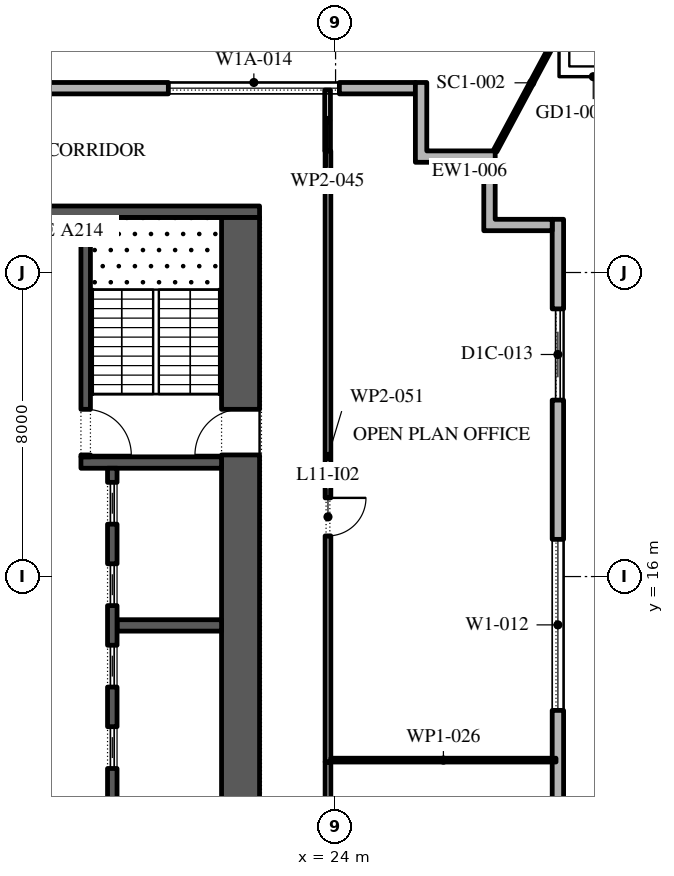
"""IFC4 building model, lengths in metres.
Left out: names, types, materials, properties, quantities, classifications, styles, units other than length and angle.
Written with IfcOpenShell. Run it as: python <this file> out.ifc"""

import sys

from ifc_helpers import new_model, si_unit, direction, frame, frame_2d, origin, place, context, subcontext, project, spatial, polyline, rectangle, outline, extrude, element, fill, save


model = new_model("IFC4")
c1 = context("Model", 3, precision=1e-05, world=origin(), true_north=direction((0.0, 1.0)))
c2 = subcontext(c1, "Body", "Model", "MODEL_VIEW")
j1 = project(units=[si_unit("LENGTHUNIT", "METRE"), si_unit("PLANEANGLEUNIT", "RADIAN")], contexts=[c1])
p1 = place(None, origin())
s1 = spatial("IfcSite", under=j1, at=p1, CompositionType="ELEMENT")
p2 = place(p1, origin())
s2 = spatial("IfcBuilding", under=s1, at=p2, CompositionType="ELEMENT")
p3 = place(p2, frame((0.0, 0.0, 56.4)))
s3 = spatial("IfcBuildingStorey", under=s2, at=p3, CompositionType="ELEMENT", Elevation=56.4)
p4 = place(p3, frame((29.85, -24.1, 0.0), z_axis=(0.0, 0.0, 1.0), x_axis=(0.0, 1.0, 0.0)))
e1 = element("IfcWall", 1, at=p4, inside=s3, PredefinedType="STANDARD", context=c2, shape_type="SweptSolid", body=[
    extrude(rectangle(XDim=49.5, YDim=0.3, at=frame_2d((24.75, 0.0))), origin(), (0.0, 0.0, 1.0), 4.0),
])
p5 = place(p4, frame((1.157, 0.0, 0.45)))
e2 = element("IfcOpeningElement", 2, at=p5, cuts=e1, PredefinedType="OPENING", context=c2, shape_type="SweptSolid", body=[
    extrude(rectangle(XDim=4.5, YDim=3.05, at=frame_2d((2.25, 1.525))), frame((0.0, 0.16, 0.0), z_axis=(0.0, -1.0, 0.0), x_axis=(1.0, 0.0, 0.0)), (0.0, 0.0, 1.0), 0.32),
])
p6 = place(p4, frame((8.121, 0.0, 0.45)))
e3 = element("IfcOpeningElement", 3, at=p6, cuts=e1, PredefinedType="OPENING", context=c2, shape_type="SweptSolid", body=[
    extrude(rectangle(XDim=4.5, YDim=2.825, at=frame_2d((2.25, 1.413))), frame((0.0, 0.16, 0.0), z_axis=(0.0, -1.0, 0.0), x_axis=(1.0, 0.0, 0.0)), (0.0, 0.0, 1.0), 0.32),
])
p7 = place(p4, frame((16.286, 0.0, 0.0)))
e4 = element("IfcOpeningElement", 4, at=p7, cuts=e1, PredefinedType="OPENING", context=c2, shape_type="SweptSolid", body=[
    extrude(rectangle(XDim=2.4, YDim=3.325, at=frame_2d((1.2, 1.663))), frame((0.0, 0.16, 0.0), z_axis=(0.0, -1.0, 0.0), x_axis=(1.0, 0.0, 0.0)), (0.0, 0.0, 1.0), 0.32),
])
p8 = place(p4, frame((22.35, 0.0, 0.45)))
e5 = element("IfcOpeningElement", 5, at=p8, cuts=e1, PredefinedType="OPENING", context=c2, shape_type="SweptSolid", body=[
    extrude(rectangle(XDim=4.5, YDim=2.875, at=frame_2d((2.25, 1.438))), frame((0.0, 0.16, 0.0), z_axis=(0.0, -1.0, 0.0), x_axis=(1.0, 0.0, 0.0)), (0.0, 0.0, 1.0), 0.32),
])
p9 = place(p4, frame((29.464, 0.0, 0.45)))
e6 = element("IfcOpeningElement", 6, at=p9, cuts=e1, PredefinedType="OPENING", context=c2, shape_type="SweptSolid", body=[
    extrude(rectangle(XDim=4.5, YDim=2.875, at=frame_2d((2.25, 1.438))), frame((0.0, 0.16, 0.0), z_axis=(0.0, -1.0, 0.0), x_axis=(1.0, 0.0, 0.0)), (0.0, 0.0, 1.0), 0.32),
])
p10 = place(p4, frame((36.579, 0.0, 0.45)))
e7 = element("IfcOpeningElement", 7, at=p10, cuts=e1, PredefinedType="OPENING", context=c2, shape_type="SweptSolid", body=[
    extrude(rectangle(XDim=4.5, YDim=3.05, at=frame_2d((2.25, 1.525))), frame((0.0, 0.16, 0.0), z_axis=(0.0, -1.0, 0.0), x_axis=(1.0, 0.0, 0.0)), (0.0, 0.0, 1.0), 0.32),
])
p11 = place(p4, frame((44.743, 0.0, 0.0)))
e8 = element("IfcOpeningElement", 8, at=p11, cuts=e1, PredefinedType="OPENING", context=c2, shape_type="SweptSolid", body=[
    extrude(rectangle(XDim=2.4, YDim=3.325, at=frame_2d((1.2, 1.663))), frame((0.0, 0.16, 0.0), z_axis=(0.0, -1.0, 0.0), x_axis=(1.0, 0.0, 0.0)), (0.0, 0.0, 1.0), 0.32),
])
p12 = place(p3, frame((26.1, 28.85, 0.0), z_axis=(0.0, 0.0, 1.0), x_axis=(-1.0, 0.0, 0.0)))
e9 = element("IfcWall", 9, at=p12, inside=s3, PredefinedType="STANDARD", context=c2, shape_type="SweptSolid", body=[
    extrude(rectangle(XDim=52.5, YDim=0.3, at=frame_2d((26.25, 0.0))), origin(), (0.0, 0.0, 1.0), 4.0),
])
p13 = place(p12, frame((2.0, 0.0, 0.45)))
e10 = element("IfcOpeningElement", 10, at=p13, cuts=e9, PredefinedType="OPENING", context=c2, shape_type="SweptSolid", body=[
    extrude(rectangle(XDim=4.5, YDim=3.0, at=frame_2d((2.25, 1.5))), frame((0.0, 0.16, 0.0), z_axis=(0.0, -1.0, 0.0), x_axis=(1.0, 0.0, 0.0)), (0.0, 0.0, 1.0), 0.32),
])
p14 = place(p12, frame((10.65, 0.0, 0.45)))
e11 = element("IfcOpeningElement", 11, at=p14, cuts=e9, PredefinedType="OPENING", context=c2, shape_type="SweptSolid", body=[
    extrude(rectangle(XDim=4.5, YDim=3.0, at=frame_2d((2.25, 1.5))), frame((0.0, 0.16, 0.0), z_axis=(0.0, -1.0, 0.0), x_axis=(1.0, 0.0, 0.0)), (0.0, 0.0, 1.0), 0.32),
])
p15 = place(p12, frame((20.5, 0.0, 0.0)))
e12 = element("IfcOpeningElement", 12, at=p15, cuts=e9, PredefinedType="OPENING", context=c2, shape_type="SweptSolid", body=[
    extrude(rectangle(XDim=2.4, YDim=3.5, at=frame_2d((1.2, 1.75))), frame((0.0, 0.16, 0.0), z_axis=(0.0, -1.0, 0.0), x_axis=(1.0, 0.0, 0.0)), (0.0, 0.0, 1.0), 0.32),
])
p16 = place(p12, frame((28.25, 0.0, 0.45)))
e13 = element("IfcOpeningElement", 13, at=p16, cuts=e9, PredefinedType="OPENING", context=c2, shape_type="SweptSolid", body=[
    extrude(rectangle(XDim=4.5, YDim=3.0, at=frame_2d((2.25, 1.5))), frame((0.0, 0.16, 0.0), z_axis=(0.0, -1.0, 0.0), x_axis=(1.0, 0.0, 0.0)), (0.0, 0.0, 1.0), 0.32),
])
p17 = place(p12, frame((37.05, 0.0, 0.45)))
e14 = element("IfcOpeningElement", 14, at=p17, cuts=e9, PredefinedType="OPENING", context=c2, shape_type="SweptSolid", body=[
    extrude(rectangle(XDim=4.5, YDim=3.0, at=frame_2d((2.25, 1.5))), frame((0.0, 0.16, 0.0), z_axis=(0.0, -1.0, 0.0), x_axis=(1.0, 0.0, 0.0)), (0.0, 0.0, 1.0), 0.32),
])
p18 = place(p12, frame((45.85, 0.0, 0.45)))
e15 = element("IfcOpeningElement", 15, at=p18, cuts=e9, PredefinedType="OPENING", context=c2, shape_type="SweptSolid", body=[
    extrude(rectangle(XDim=4.5, YDim=3.0, at=frame_2d((2.25, 1.5))), frame((0.0, 0.16, 0.0), z_axis=(0.0, -1.0, 0.0), x_axis=(1.0, 0.0, 0.0)), (0.0, 0.0, 1.0), 0.32),
])
p19 = place(p3, origin())
e16 = element("IfcWall", 16, at=p19, inside=s3, PredefinedType="STANDARD", context=c2, shape_type="SweptSolid", body=[
    extrude(outline(polyline([(27.9, 26.9), (26.1, 26.9), (26.1, 29.0), (26.4, 29.0), (26.4, 27.2), (28.2, 27.2), (28.2, 25.4), (29.7, 25.4), (29.7, 25.1), (27.9, 25.1), (27.9, 26.9)])), origin(), (0.0, 0.0, 1.0), 4.0),
])
p20 = place(p3, frame((28.2, 27.2, -0.05), z_axis=(0.0, 0.0, 1.0), x_axis=(0.472846131844, 0.881145013945, 0.0)))
e17 = element("IfcWall", 17, at=p20, inside=s3, PredefinedType="STANDARD", context=c2, shape_type="SweptSolid", body=[
    extrude(rectangle(XDim=4.066, YDim=0.1, at=frame_2d((2.033, 0.0))), origin(), (0.0, 0.0, 1.0), 4.05),
])
p21 = place(p3, frame((21.5, -2.45, 0.0), z_axis=(0.0, 0.0, 1.0), x_axis=(0.0, 1.0, 0.0)))
e18 = element("IfcWall", 18, at=p21, inside=s3, PredefinedType="SHEAR", context=c2, shape_type="SweptSolid", body=[
    extrude(rectangle(XDim=27.9, YDim=1.0, at=frame_2d((13.95, 0.0))), origin(), (0.0, 0.0, 1.0), 4.0),
])
p22 = place(p21, frame((5.05, 0.0, 0.0)))
e19 = element("IfcOpeningElement", 19, at=p22, cuts=e18, PredefinedType="OPENING", context=c2, shape_type="SweptSolid", body=[
    extrude(rectangle(XDim=1.2, YDim=2.1, at=frame_2d((0.6, 1.05))), frame((0.0, 0.51, 0.0), z_axis=(0.0, -1.0, 0.0), x_axis=(1.0, 0.0, 0.0)), (0.0, 0.0, 1.0), 1.02),
])
p23 = place(p21, frame((21.65, 0.0, 0.0)))
e20 = element("IfcOpeningElement", 20, at=p23, cuts=e18, PredefinedType="OPENING", context=c2, shape_type="SweptSolid", body=[
    extrude(rectangle(XDim=1.2, YDim=2.1, at=frame_2d((0.6, 1.05))), frame((0.0, 0.51, 0.0), z_axis=(0.0, -1.0, 0.0), x_axis=(1.0, 0.0, 0.0)), (0.0, 0.0, 1.0), 1.02),
])
p24 = place(p3, frame((10.0, 25.6, 0.0), z_axis=(0.0, 0.0, 1.0), x_axis=(1.0, 0.0, 0.0)))
e21 = element("IfcWall", 21, at=p24, inside=s3, PredefinedType="SHEAR", context=c2, shape_type="SweptSolid", body=[
    extrude(rectangle(XDim=12.0, YDim=0.3, at=frame_2d((6.0, 0.0))), origin(), (0.0, 0.0, 1.0), 4.0),
])
p25 = place(p3, frame((17.3, 19.0, 0.0), z_axis=(0.0, 0.0, 1.0), x_axis=(1.0, 0.0, 0.0)))
e22 = element("IfcWall", 22, at=p25, inside=s3, PredefinedType="SHEAR", context=c2, shape_type="SweptSolid", body=[
    extrude(rectangle(XDim=3.7, YDim=0.3, at=frame_2d((1.85, 0.0))), origin(), (0.0, 0.0, 1.0), 4.0),
])
p26 = place(p3, frame((17.425, 19.15, 0.0), z_axis=(0.0, 0.0, 1.0), x_axis=(0.0, 1.0, 0.0)))
e23 = element("IfcWall", 23, at=p26, inside=s3, PredefinedType="SHEAR", context=c2, shape_type="SweptSolid", body=[
    extrude(rectangle(XDim=6.3, YDim=0.25, at=frame_2d((3.15, 0.0))), origin(), (0.0, 0.0, 1.0), 4.0),
])
p27 = place(p26, frame((0.05, 0.0, 0.0)))
e24 = element("IfcOpeningElement", 24, at=p27, cuts=e23, PredefinedType="OPENING", context=c2, shape_type="SweptSolid", body=[
    extrude(rectangle(XDim=1.2, YDim=2.1, at=frame_2d((0.6, 1.05))), frame((0.0, 0.135, 0.0), z_axis=(0.0, -1.0, 0.0), x_axis=(1.0, 0.0, 0.0)), (0.0, 0.0, 1.0), 0.27),
])
p28 = place(p3, frame((18.25, 14.714, 0.0), z_axis=(0.0, 0.0, 1.0), x_axis=(1.0, 0.0, 0.0)))
e25 = element("IfcWall", 25, at=p28, inside=s3, PredefinedType="SHEAR", context=c2, shape_type="SweptSolid", body=[
    extrude(rectangle(XDim=2.75, YDim=0.3, at=frame_2d((1.375, 0.0))), origin(), (0.0, 0.0, 1.0), 4.0),
])
p29 = place(p3, frame((18.125, 4.15, 0.0), z_axis=(0.0, 0.0, 1.0), x_axis=(0.0, 1.0, 0.0)))
e26 = element("IfcWall", 26, at=p29, inside=s3, PredefinedType="SHEAR", context=c2, shape_type="SweptSolid", body=[
    extrude(rectangle(XDim=14.7, YDim=0.25, at=frame_2d((7.35, 0.0))), origin(), (0.0, 0.0, 1.0), 4.0),
])
p30 = place(p29, frame((0.371, 0.0, 0.0)))
e27 = element("IfcOpeningElement", 27, at=p30, cuts=e26, PredefinedType="OPENING", context=c2, shape_type="SweptSolid", body=[
    extrude(rectangle(XDim=1.1, YDim=2.1, at=frame_2d((0.55, 1.05))), frame((0.0, 0.135, 0.0), z_axis=(0.0, -1.0, 0.0), x_axis=(1.0, 0.0, 0.0)), (0.0, 0.0, 1.0), 0.27),
])
p31 = place(p29, frame((2.514, 0.0, 0.0)))
e28 = element("IfcOpeningElement", 28, at=p31, cuts=e26, PredefinedType="OPENING", context=c2, shape_type="SweptSolid", body=[
    extrude(rectangle(XDim=1.1, YDim=2.1, at=frame_2d((0.55, 1.05))), frame((0.0, 0.135, 0.0), z_axis=(0.0, -1.0, 0.0), x_axis=(1.0, 0.0, 0.0)), (0.0, 0.0, 1.0), 0.27),
])
p32 = place(p29, frame((4.657, 0.0, 0.0)))
e29 = element("IfcOpeningElement", 29, at=p32, cuts=e26, PredefinedType="OPENING", context=c2, shape_type="SweptSolid", body=[
    extrude(rectangle(XDim=1.1, YDim=2.1, at=frame_2d((0.55, 1.05))), frame((0.0, 0.135, 0.0), z_axis=(0.0, -1.0, 0.0), x_axis=(1.0, 0.0, 0.0)), (0.0, 0.0, 1.0), 0.27),
])
p33 = place(p29, frame((6.8, 0.0, 0.0)))
e30 = element("IfcOpeningElement", 30, at=p33, cuts=e26, PredefinedType="OPENING", context=c2, shape_type="SweptSolid", body=[
    extrude(rectangle(XDim=1.1, YDim=2.1, at=frame_2d((0.55, 1.05))), frame((0.0, 0.135, 0.0), z_axis=(0.0, -1.0, 0.0), x_axis=(1.0, 0.0, 0.0)), (0.0, 0.0, 1.0), 0.27),
])
p34 = place(p29, frame((8.943, 0.0, 0.0)))
e31 = element("IfcOpeningElement", 31, at=p34, cuts=e26, PredefinedType="OPENING", context=c2, shape_type="SweptSolid", body=[
    extrude(rectangle(XDim=1.1, YDim=2.1, at=frame_2d((0.55, 1.05))), frame((0.0, 0.135, 0.0), z_axis=(0.0, -1.0, 0.0), x_axis=(1.0, 0.0, 0.0)), (0.0, 0.0, 1.0), 0.27),
])
p35 = place(p29, frame((11.086, 0.0, 0.0)))
e32 = element("IfcOpeningElement", 32, at=p35, cuts=e26, PredefinedType="OPENING", context=c2, shape_type="SweptSolid", body=[
    extrude(rectangle(XDim=1.1, YDim=2.1, at=frame_2d((0.55, 1.05))), frame((0.0, 0.135, 0.0), z_axis=(0.0, -1.0, 0.0), x_axis=(1.0, 0.0, 0.0)), (0.0, 0.0, 1.0), 0.27),
])
p36 = place(p29, frame((13.229, 0.0, 0.0)))
e33 = element("IfcOpeningElement", 33, at=p36, cuts=e26, PredefinedType="OPENING", context=c2, shape_type="SweptSolid", body=[
    extrude(rectangle(XDim=1.1, YDim=2.1, at=frame_2d((0.55, 1.05))), frame((0.0, 0.135, 0.0), z_axis=(0.0, -1.0, 0.0), x_axis=(1.0, 0.0, 0.0)), (0.0, 0.0, 1.0), 0.27),
])
p37 = place(p3, frame((23.79, 28.8, 0.0), z_axis=(0.0, 0.0, 1.0), x_axis=(0.0, -1.0, 0.0)))
e34 = element("IfcWall", 34, at=p37, inside=s3, PredefinedType="PARTITIONING", context=c2, shape_type="SweptSolid", body=[
    extrude(rectangle(XDim=1.6, YDim=0.15, at=frame_2d((0.8, 0.0))), origin(), (0.0, 0.0, 1.0), 4.0),
])
p38 = place(p3, frame((23.8, 11.12, 0.0), z_axis=(0.0, 0.0, 1.0), x_axis=(0.0, -1.0, 0.0)))
e35 = element("IfcWall", 35, at=p38, inside=s3, PredefinedType="PARTITIONING", context=c2, shape_type="SweptSolid", body=[
    extrude(rectangle(XDim=7.01, YDim=0.15, at=frame_2d((3.505, 0.0))), origin(), (0.0, 0.0, 1.0), 4.0),
])
p39 = place(p38, frame((2.41, 0.0, 0.0)))
e36 = element("IfcOpeningElement", 36, at=p39, cuts=e35, PredefinedType="OPENING", context=c2, shape_type="SweptSolid", body=[
    extrude(rectangle(XDim=1.0, YDim=2.1, at=frame_2d((0.5, 1.05))), frame((0.0, 0.085, 0.0), z_axis=(0.0, -1.0, 0.0), x_axis=(1.0, 0.0, 0.0)), (0.0, 0.0, 1.0), 0.17),
])
p40 = place(p3, frame((23.8, 27.2, 0.0), z_axis=(0.0, 0.0, 1.0), x_axis=(0.0, -1.0, 0.0)))
e37 = element("IfcWall", 37, at=p40, inside=s3, PredefinedType="PARTITIONING", context=c2, shape_type="SweptSolid", body=[
    extrude(rectangle(XDim=16.08, YDim=0.15, at=frame_2d((8.04, 0.0))), origin(), (0.0, 0.0, 1.0), 4.0),
])
p41 = place(p40, frame((9.13, 0.0, 0.0)))
e38 = element("IfcOpeningElement", 38, at=p41, cuts=e37, PredefinedType="OPENING", context=c2, shape_type="SweptSolid", body=[
    extrude(rectangle(XDim=1.0, YDim=2.1, at=frame_2d((0.5, 1.05))), frame((0.0, 0.085, 0.0), z_axis=(0.0, -1.0, 0.0), x_axis=(1.0, 0.0, 0.0)), (0.0, 0.0, 1.0), 0.17),
])
p42 = place(p3, frame((29.8, 11.17, 0.0), z_axis=(0.0, 0.0, 1.0), x_axis=(-1.0, 0.0, 0.0)))
e39 = element("IfcWall", 39, at=p42, inside=s3, PredefinedType="PARTITIONING", context=c2, shape_type="SweptSolid", body=[
    extrude(rectangle(XDim=5.925, YDim=0.1, at=frame_2d((2.962, 0.0))), origin(), (0.0, 0.0, 1.0), 4.0),
])
p43 = place(p10, origin())
e40 = element("IfcWindow", 40, at=p43, inside=s3, PartitioningType="DOUBLE_PANEL_VERTICAL", PredefinedType="WINDOW", context=c2, shape_type="SweptSolid", body=[
    extrude(rectangle(XDim=4.5, YDim=3.05, at=frame_2d((2.25, 1.525))), frame((0.0, 0.03, 0.0), z_axis=(0.0, -1.0, 0.0), x_axis=(1.0, 0.0, 0.0)), (0.0, 0.0, 1.0), 0.06),
])
fill(e7, e40)
p44 = place(p11, origin())
e41 = element("IfcDoor", 41, at=p44, inside=s3, OperationType="DOUBLE_DOOR_SLIDING", PredefinedType="DOOR", context=c2, shape_type="SweptSolid", body=[
    extrude(rectangle(XDim=2.4, YDim=3.325, at=frame_2d((1.2, 1.663))), frame((0.0, 0.025, 0.0), z_axis=(0.0, -1.0, 0.0), x_axis=(1.0, 0.0, 0.0)), (0.0, 0.0, 1.0), 0.05),
])
fill(e8, e41)
p45 = place(p13, origin())
e42 = element("IfcWindow", 42, at=p45, inside=s3, PartitioningType="DOUBLE_PANEL_VERTICAL", PredefinedType="WINDOW", context=c2, shape_type="SweptSolid", body=[
    extrude(rectangle(XDim=4.5, YDim=3.0, at=frame_2d((2.25, 1.5))), frame((0.0, 0.03, 0.0), z_axis=(0.0, -1.0, 0.0), x_axis=(1.0, 0.0, 0.0)), (0.0, 0.0, 1.0), 0.06),
])
fill(e10, e42)
p46 = place(p33, origin())
e43 = element("IfcDoor", 43, at=p46, inside=s3, OperationType="SLIDING_TO_LEFT", PredefinedType="DOOR", context=c2, shape_type="SweptSolid", body=[
    extrude(rectangle(XDim=1.1, YDim=2.1, at=frame_2d((0.55, 1.05))), frame((0.0, 0.025, 0.0), z_axis=(0.0, -1.0, 0.0), x_axis=(1.0, 0.0, 0.0)), (0.0, 0.0, 1.0), 0.05),
])
fill(e30, e43)
p47 = place(p34, origin())
e44 = element("IfcDoor", 44, at=p47, inside=s3, OperationType="SLIDING_TO_LEFT", PredefinedType="DOOR", context=c2, shape_type="SweptSolid", body=[
    extrude(rectangle(XDim=1.1, YDim=2.1, at=frame_2d((0.55, 1.05))), frame((0.0, 0.025, 0.0), z_axis=(0.0, -1.0, 0.0), x_axis=(1.0, 0.0, 0.0)), (0.0, 0.0, 1.0), 0.05),
])
fill(e31, e44)
p48 = place(p35, origin())
e45 = element("IfcDoor", 45, at=p48, inside=s3, OperationType="SLIDING_TO_LEFT", PredefinedType="DOOR", context=c2, shape_type="SweptSolid", body=[
    extrude(rectangle(XDim=1.1, YDim=2.1, at=frame_2d((0.55, 1.05))), frame((0.0, 0.025, 0.0), z_axis=(0.0, -1.0, 0.0), x_axis=(1.0, 0.0, 0.0)), (0.0, 0.0, 1.0), 0.05),
])
fill(e32, e45)
p49 = place(p36, origin())
e46 = element("IfcDoor", 46, at=p49, inside=s3, OperationType="SLIDING_TO_LEFT", PredefinedType="DOOR", context=c2, shape_type="SweptSolid", body=[
    extrude(rectangle(XDim=1.1, YDim=2.1, at=frame_2d((0.55, 1.05))), frame((0.0, 0.025, 0.0), z_axis=(0.0, -1.0, 0.0), x_axis=(1.0, 0.0, 0.0)), (0.0, 0.0, 1.0), 0.05),
])
fill(e33, e46)
p50 = place(p27, frame((1.2, 0.0, 0.0), z_axis=(0.0, 0.0, 1.0), x_axis=(-1.0, 0.0, 0.0)))
e47 = element("IfcDoor", 47, at=p50, inside=s3, OperationType="SINGLE_SWING_LEFT", PredefinedType="DOOR", context=c2, shape_type="SweptSolid", body=[
    extrude(rectangle(XDim=1.2, YDim=2.1, at=frame_2d((0.6, 1.05))), frame((0.0, 0.025, 0.0), z_axis=(0.0, -1.0, 0.0), x_axis=(1.0, 0.0, 0.0)), (0.0, 0.0, 1.0), 0.05),
])
fill(e24, e47)
p51 = place(p23, origin())
e48 = element("IfcDoor", 48, at=p51, inside=s3, OperationType="SINGLE_SWING_RIGHT", PredefinedType="DOOR", context=c2, shape_type="SweptSolid", body=[
    extrude(rectangle(XDim=1.2, YDim=2.1, at=frame_2d((0.6, 1.05))), frame((0.0, 0.025, 0.0), z_axis=(0.0, -1.0, 0.0), x_axis=(1.0, 0.0, 0.0)), (0.0, 0.0, 1.0), 0.05),
])
fill(e20, e48)
p52 = place(p41, origin())
e49 = element("IfcDoor", 49, at=p52, inside=s3, OperationType="SINGLE_SWING_RIGHT", PredefinedType="DOOR", context=c2, shape_type="SweptSolid", body=[
    extrude(rectangle(XDim=1.0, YDim=2.1, at=frame_2d((0.5, 1.05))), frame((0.0, 0.025, 0.0), z_axis=(0.0, -1.0, 0.0), x_axis=(1.0, 0.0, 0.0)), (0.0, 0.0, 1.0), 0.05),
])
fill(e38, e49)
save(model, sys.argv[1])
